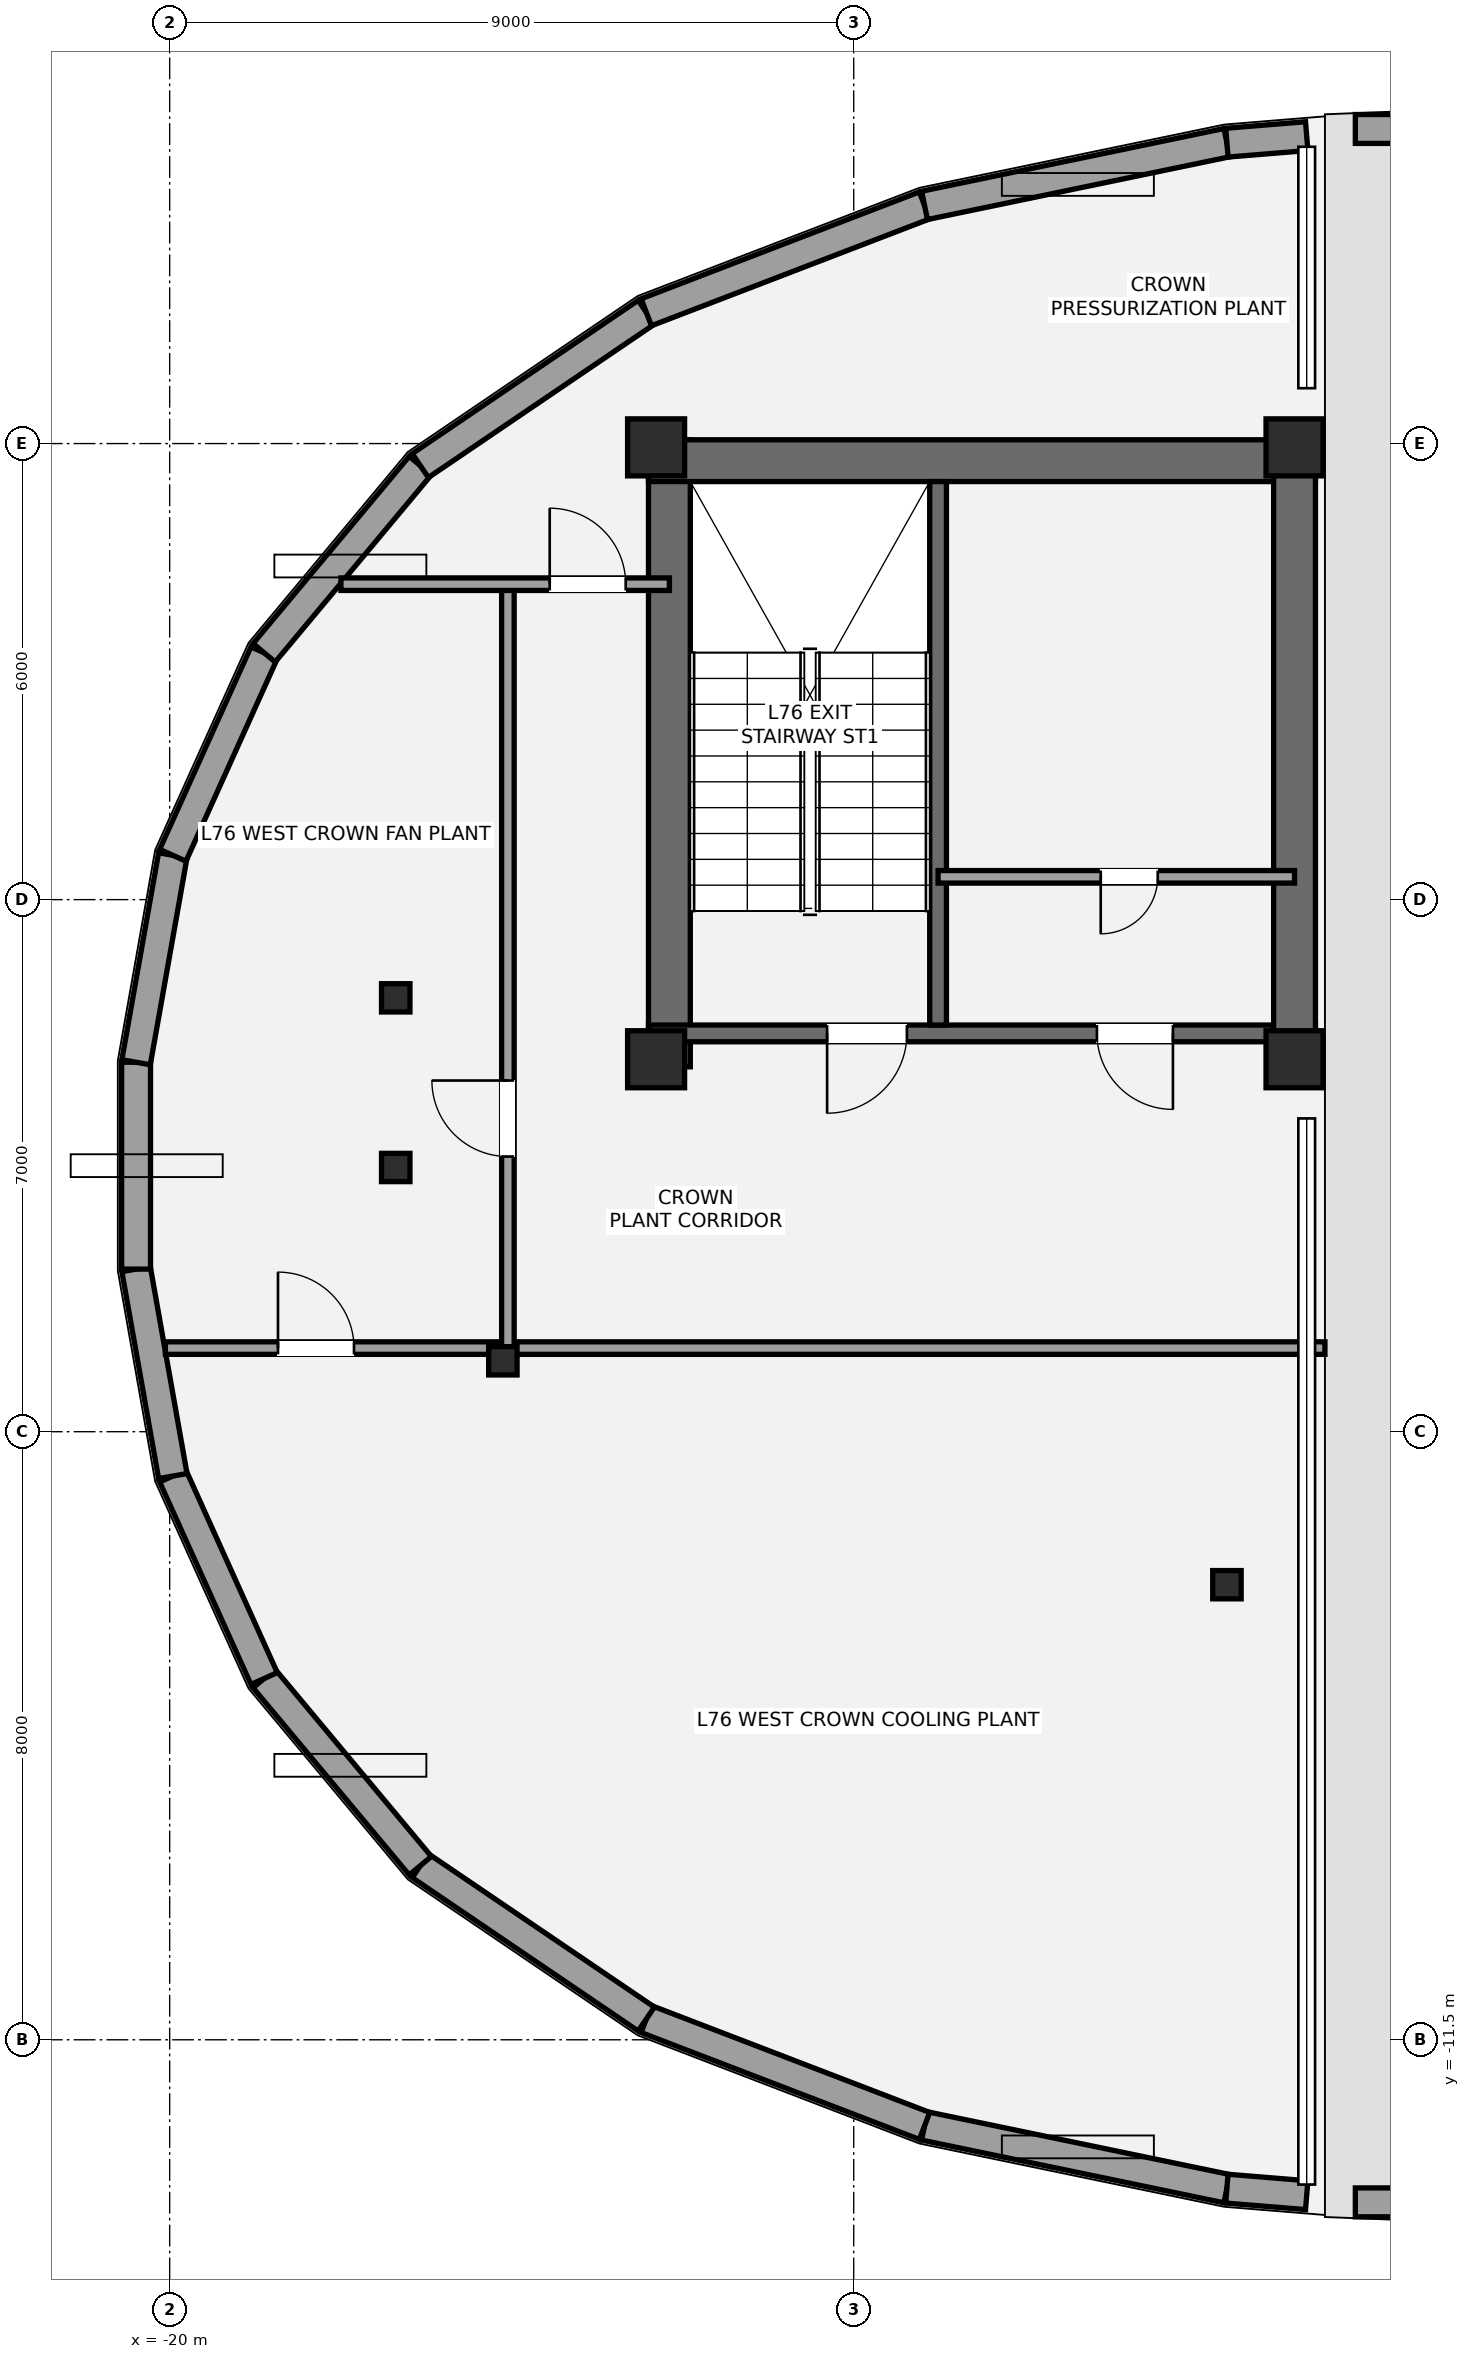
"""IFC4 building model, lengths in metres.
Left out: names, types, materials, properties, quantities, classifications, styles, units other than length and angle.
Written with IfcOpenShell. Run it as: python <this file> out.ifc"""

import sys

from ifc_helpers import new_model, si_unit, direction, frame, frame_2d, origin, origin_2d, place, context, subcontext, project, spatial, rectangle, i_section, extrude, element, fill, save


model = new_model("IFC4")
c1 = context("Model", 3, precision=1e-05, world=origin(), true_north=direction((0.0, 1.0)))
c2 = subcontext(c1, "Body", "Model", "MODEL_VIEW")
j1 = project(units=[si_unit("LENGTHUNIT", "METRE"), si_unit("PLANEANGLEUNIT", "RADIAN")], contexts=[c1])
p1 = place(None, origin())
s1 = spatial("IfcSite", under=j1, at=p1, CompositionType="ELEMENT")
p2 = place(p1, origin())
s2 = spatial("IfcBuilding", under=s1, at=p2, CompositionType="ELEMENT")
p3 = place(p2, frame((0.0, 0.0, 269.2)))
s3 = spatial("IfcBuildingStorey", under=s2, at=p3, CompositionType="ELEMENT", Elevation=269.2)
p4 = place(p3, frame((-13.425, 1.3, 0.0), z_axis=(0.0, 0.0, 1.0), x_axis=(0.0, 1.0, 0.0)))
e1 = element("IfcWall", 1, at=p4, inside=s3, PredefinedType="SHEAR", context=c2, shape_type="SweptSolid", body=[
    extrude(rectangle(XDim=8.25, YDim=0.55, at=frame_2d((4.125, 0.0))), origin(), (0.0, 0.0, 1.0), 3.8),
])
p5 = place(p3, frame((-13.7, 9.275, 0.0), z_axis=(0.0, 0.0, 1.0), x_axis=(1.0, 0.0, 0.0)))
e2 = element("IfcWall", 2, at=p5, inside=s3, PredefinedType="SHEAR", context=c2, shape_type="SweptSolid", body=[
    extrude(rectangle(XDim=8.775, YDim=0.55, at=frame_2d((4.387, 0.0))), origin(), (0.0, 0.0, 1.0), 3.8),
])
p6 = place(p3, frame((-4.925, 1.74, 0.0), z_axis=(0.0, 0.0, 1.0), x_axis=(-1.0, 0.0, 0.0)))
e3 = element("IfcWall", 3, at=p6, inside=s3, PredefinedType="SHEAR", context=c2, shape_type="SweptSolid", body=[
    extrude(rectangle(XDim=8.775, YDim=0.22, at=frame_2d((4.387, 0.0))), origin(), (0.0, 0.0, 1.0), 3.8),
])
p7 = place(p6, frame((5.375, 0.0, 0.0)))
e4 = element("IfcOpeningElement", 4, at=p7, cuts=e3, PredefinedType="OPENING", context=c2, shape_type="SweptSolid", body=[
    extrude(rectangle(XDim=1.05, YDim=2.15, at=frame_2d((0.525, 1.075))), frame((0.0, 0.12, 0.0), z_axis=(0.0, -1.0, 0.0), x_axis=(1.0, 0.0, 0.0)), (0.0, 0.0, 1.0), 0.24),
])
p8 = place(p6, frame((1.875, 0.0, 0.0)))
e5 = element("IfcOpeningElement", 5, at=p8, cuts=e3, PredefinedType="OPENING", context=c2, shape_type="SweptSolid", body=[
    extrude(rectangle(XDim=1.0, YDim=2.15, at=frame_2d((0.5, 1.075))), frame((0.0, 0.12, 0.0), z_axis=(0.0, -1.0, 0.0), x_axis=(1.0, 0.0, 0.0)), (0.0, 0.0, 1.0), 0.24),
])
p9 = place(p3, frame((-5.2, 1.3, 0.0), z_axis=(0.0, 0.0, 1.0), x_axis=(0.0, 1.0, 0.0)))
e6 = element("IfcWall", 6, at=p9, inside=s3, PredefinedType="SHEAR", context=c2, shape_type="SweptSolid", body=[
    extrude(rectangle(XDim=8.25, YDim=0.55, at=frame_2d((4.125, 0.0))), origin(), (0.0, 0.0, 1.0), 3.8),
])
p10 = place(p3, frame((-9.89, 1.85, 0.0), z_axis=(0.0, 0.0, 1.0), x_axis=(0.0, 1.0, 0.0)))
e7 = element("IfcWall", 7, at=p10, inside=s3, PredefinedType="SHEAR", context=c2, shape_type="SweptSolid", body=[
    extrude(rectangle(XDim=7.15, YDim=0.22, at=frame_2d((3.575, 0.0))), origin(), (0.0, 0.0, 1.0), 3.8),
])
for number, where, z_axis, x_axis in (
    (8, (-13.6, 1.4, 0.0), (0.0, 0.0, 1.0), (1.0, 0.0, 0.0)),
    (9, (-13.6, 9.45, 0.0), (0.0, 0.0, 1.0), (1.0, 0.0, 0.0)),
    (10, (-5.2, 1.4, 0.0), (0.0, 0.0, 1.0), (1.0, 0.0, 0.0)),
    (11, (-5.2, 9.45, 0.0), (0.0, 0.0, 1.0), (1.0, 0.0, 0.0)),
):
    element("IfcColumn", number, at=place(p3, frame(where, z_axis=z_axis, x_axis=x_axis)), inside=s3, PredefinedType="PILASTER", context=c2, shape_type="SweptSolid", body=[
        extrude(rectangle(XDim=0.75, YDim=0.75, at=origin_2d()), origin(), (0.0, 0.0, 1.0), 3.8),
    ])
for number, where, z_axis, x_axis in (
    (12, (-17.026, 2.208, 0.0), (0.0, 0.0, 1.0), (1.0, 0.0, 0.0)),
    (13, (-17.026, -0.024, 0.0), (0.0, 0.0, 1.0), (1.0, 0.0, 0.0)),
    (14, (-15.616, -2.567, 0.0), (0.0, 0.0, 1.0), (1.0, 0.0, 0.0)),
    (15, (-6.09, -5.513, 0.0), (0.0, 0.0, 1.0), (1.0, 0.0, 0.0)),
):
    element("IfcColumn", number, at=place(p3, frame(where, z_axis=z_axis, x_axis=x_axis)), inside=s3, PredefinedType="COLUMN", context=c2, shape_type="SweptSolid", body=[
        extrude(i_section(OverallWidth=0.374, OverallDepth=0.372, WebThickness=0.016, FlangeThickness=0.026, at=origin_2d()), origin(), (0.0, 0.0, 1.0), 3.8),
    ])
p11 = place(p3, frame((-10.068, -12.634, 0.0), z_axis=(0.0, 0.0, 1.0), x_axis=(0.97915503901, -0.203114277148, 0.0)))
e16 = element("IfcWall", 16, at=p11, inside=s3, PredefinedType="ELEMENTEDWALL", context=c2, shape_type="SweptSolid", body=[
    extrude(rectangle(XDim=4.063, YDim=0.38, at=frame_2d((2.031, 0.0))), origin(), (0.0, 0.0, 1.0), 2.97),
])
p12 = place(p3, frame((-13.729, -11.227, 0.0), z_axis=(0.0, 0.0, 1.0), x_axis=(0.933505951982, -0.358561902068, 0.0)))
e17 = element("IfcWall", 17, at=p12, inside=s3, PredefinedType="ELEMENTEDWALL", context=c2, shape_type="SweptSolid", body=[
    extrude(rectangle(XDim=3.922, YDim=0.38, at=frame_2d((1.961, 0.0))), origin(), (0.0, 0.0, 1.0), 2.97),
])
p13 = place(p3, frame((-16.703, -9.21, 0.0), z_axis=(0.0, 0.0, 1.0), x_axis=(0.827549057152, -0.56139340752, 0.0)))
e18 = element("IfcWall", 18, at=p13, inside=s3, PredefinedType="ELEMENTEDWALL", context=c2, shape_type="SweptSolid", body=[
    extrude(rectangle(XDim=3.593, YDim=0.38, at=frame_2d((1.796, 0.0))), origin(), (0.0, 0.0, 1.0), 2.97),
])
p14 = place(p3, frame((-18.758, -6.748, 0.0), z_axis=(0.0, 0.0, 1.0), x_axis=(0.640685893821, -0.76780309029, 0.0)))
e19 = element("IfcWall", 19, at=p14, inside=s3, PredefinedType="ELEMENTEDWALL", context=c2, shape_type="SweptSolid", body=[
    extrude(rectangle(XDim=3.207, YDim=0.38, at=frame_2d((1.604, 0.0))), origin(), (0.0, 0.0, 1.0), 2.97),
])
p15 = place(p3, frame((-19.959, -4.083, 0.0), z_axis=(0.0, 0.0, 1.0), x_axis=(0.411031522025, -0.911621131777, 0.0)))
e20 = element("IfcWall", 20, at=p15, inside=s3, PredefinedType="ELEMENTEDWALL", context=c2, shape_type="SweptSolid", body=[
    extrude(rectangle(XDim=2.922, YDim=0.38, at=frame_2d((1.461, 0.0))), origin(), (0.0, 0.0, 1.0), 2.97),
])
p16 = place(p3, frame((-20.442, -1.361, 0.0), z_axis=(0.0, 0.0, 1.0), x_axis=(0.174812712861, -0.984601703951, 0.0)))
e21 = element("IfcWall", 21, at=p16, inside=s3, PredefinedType="ELEMENTEDWALL", context=c2, shape_type="SweptSolid", body=[
    extrude(rectangle(XDim=2.765, YDim=0.38, at=frame_2d((1.383, 0.0))), origin(), (0.0, 0.0, 1.0), 2.97),
])
p17 = place(p3, frame((-20.442, 1.361, 0.0), z_axis=(0.0, 0.0, 1.0), x_axis=(0.0, -1.0, 0.0)))
e22 = element("IfcWall", 22, at=p17, inside=s3, PredefinedType="ELEMENTEDWALL", context=c2, shape_type="SweptSolid", body=[
    extrude(rectangle(XDim=2.722, YDim=0.38, at=frame_2d((1.361, 0.0))), origin(), (0.0, 0.0, 1.0), 2.97),
])
p18 = place(p3, frame((-19.959, 4.083, 0.0), z_axis=(0.0, 0.0, 1.0), x_axis=(-0.174812712861, -0.984601703951, 0.0)))
e23 = element("IfcWall", 23, at=p18, inside=s3, PredefinedType="ELEMENTEDWALL", context=c2, shape_type="SweptSolid", body=[
    extrude(rectangle(XDim=2.765, YDim=0.38, at=frame_2d((1.383, 0.0))), origin(), (0.0, 0.0, 1.0), 2.97),
])
p19 = place(p3, frame((-18.758, 6.748, 0.0), z_axis=(0.0, 0.0, 1.0), x_axis=(-0.411031522025, -0.911621131777, 0.0)))
e24 = element("IfcWall", 24, at=p19, inside=s3, PredefinedType="ELEMENTEDWALL", context=c2, shape_type="SweptSolid", body=[
    extrude(rectangle(XDim=2.922, YDim=0.38, at=frame_2d((1.461, 0.0))), origin(), (0.0, 0.0, 1.0), 2.97),
])
p20 = place(p3, frame((-16.703, 9.21, 0.0), z_axis=(0.0, 0.0, 1.0), x_axis=(-0.640685893821, -0.76780309029, 0.0)))
e25 = element("IfcWall", 25, at=p20, inside=s3, PredefinedType="ELEMENTEDWALL", context=c2, shape_type="SweptSolid", body=[
    extrude(rectangle(XDim=3.207, YDim=0.38, at=frame_2d((1.604, 0.0))), origin(), (0.0, 0.0, 1.0), 2.97),
])
p21 = place(p3, frame((-13.729, 11.227, 0.0), z_axis=(0.0, 0.0, 1.0), x_axis=(-0.827549057152, -0.56139340752, 0.0)))
e26 = element("IfcWall", 26, at=p21, inside=s3, PredefinedType="ELEMENTEDWALL", context=c2, shape_type="SweptSolid", body=[
    extrude(rectangle(XDim=3.593, YDim=0.38, at=frame_2d((1.796, 0.0))), origin(), (0.0, 0.0, 1.0), 2.97),
])
p22 = place(p3, frame((-10.068, 12.634, 0.0), z_axis=(0.0, 0.0, 1.0), x_axis=(-0.933505951982, -0.358561902068, 0.0)))
e27 = element("IfcWall", 27, at=p22, inside=s3, PredefinedType="ELEMENTEDWALL", context=c2, shape_type="SweptSolid", body=[
    extrude(rectangle(XDim=3.922, YDim=0.38, at=frame_2d((1.961, 0.0))), origin(), (0.0, 0.0, 1.0), 2.97),
])
p23 = place(p3, frame((-6.09, 13.459, 0.0), z_axis=(0.0, 0.0, 1.0), x_axis=(-0.97915503901, -0.203114277148, 0.0)))
e28 = element("IfcWall", 28, at=p23, inside=s3, PredefinedType="ELEMENTEDWALL", context=c2, shape_type="SweptSolid", body=[
    extrude(rectangle(XDim=4.063, YDim=0.38, at=frame_2d((2.031, 0.0))), origin(), (0.0, 0.0, 1.0), 2.97),
])
for number, where, z_axis, x_axis in (
    (29, (-5.04, 13.545, 0.0), (0.0, 0.0, 1.0), (-0.997, -0.082, 0.0)),
    (30, (-6.09, -13.459, 0.0), (0.0, 0.0, 1.0), (0.997, -0.082, 0.0)),
):
    element("IfcWall", number, at=place(p3, frame(where, z_axis=z_axis, x_axis=x_axis)), inside=s3, PredefinedType="ELEMENTEDWALL", context=c2, shape_type="SweptSolid", body=[
        extrude(rectangle(XDim=1.053, YDim=0.38, at=frame_2d((0.527, 0.0))), origin(), (0.0, 0.0, 1.0), 2.97),
    ])
for number, where, z_axis, x_axis in (
    (31, (-4.4, -13.639, 0.0), (0.0, 0.0, 1.0), (1.0, 0.0, 0.0)),
    (32, (4.4, 13.639, 0.0), (0.0, 0.0, 1.0), (-1.0, 0.0, 0.0)),
):
    element("IfcWall", number, at=place(p3, frame(where, z_axis=z_axis, x_axis=x_axis)), inside=s3, PredefinedType="PARAPET", context=c2, shape_type="SweptSolid", body=[
        extrude(rectangle(XDim=8.8, YDim=0.38, at=frame_2d((4.4, 0.0))), origin(), (0.0, 0.0, 1.0), 1.15),
    ])
p24 = place(p3, frame((-5.2, 3.8, 0.0), z_axis=(0.0, 0.0, 1.0), x_axis=(-1.0, 0.0, 0.0)))
e33 = element("IfcWall", 33, at=p24, inside=s3, PredefinedType="PARTITIONING", context=c2, shape_type="SweptSolid", body=[
    extrude(rectangle(XDim=4.69, YDim=0.165, at=frame_2d((2.345, 0.0))), origin(), (0.0, 0.0, 1.0), 3.6),
])
p25 = place(p24, frame((1.8, 0.0, 0.0)))
e34 = element("IfcOpeningElement", 34, at=p25, cuts=e33, PredefinedType="OPENING", context=c2, shape_type="SweptSolid", body=[
    extrude(rectangle(XDim=0.75, YDim=2.1, at=frame_2d((0.375, 1.05))), frame((0.0, 0.093, 0.0), z_axis=(0.0, -1.0, 0.0), x_axis=(1.0, 0.0, 0.0)), (0.0, 0.0, 1.0), 0.185),
])
p26 = place(p3, frame((-20.056, -2.4, 0.0), z_axis=(0.0, 0.0, 1.0), x_axis=(1.0, 0.0, 0.0)))
e35 = element("IfcWall", 35, at=p26, inside=s3, PredefinedType="PARTITIONING", context=c2, shape_type="SweptSolid", body=[
    extrude(rectangle(XDim=15.256, YDim=0.165, at=frame_2d((7.628, 0.0))), origin(), (0.0, 0.0, 1.0), 2.987),
])
p27 = place(p26, frame((1.482, 0.0, 0.0)))
e36 = element("IfcOpeningElement", 36, at=p27, cuts=e35, PredefinedType="OPENING", context=c2, shape_type="SweptSolid", body=[
    extrude(rectangle(XDim=1.0, YDim=2.15, at=frame_2d((0.5, 1.075))), frame((0.0, 0.093, 0.0), z_axis=(0.0, -1.0, 0.0), x_axis=(1.0, 0.0, 0.0)), (0.0, 0.0, 1.0), 0.185),
])
p28 = place(p3, frame((-15.55, -2.4, 0.0), z_axis=(0.0, 0.0, 1.0), x_axis=(0.0, 1.0, 0.0)))
e37 = element("IfcWall", 37, at=p28, inside=s3, PredefinedType="PARTITIONING", context=c2, shape_type="SweptSolid", body=[
    extrude(rectangle(XDim=10.05, YDim=0.165, at=frame_2d((5.025, 0.0))), origin(), (0.0, 0.0, 1.0), 2.987),
])
p29 = place(p28, frame((2.52, 0.0, 0.0)))
e38 = element("IfcOpeningElement", 38, at=p29, cuts=e37, PredefinedType="OPENING", context=c2, shape_type="SweptSolid", body=[
    extrude(rectangle(XDim=1.0, YDim=2.15, at=frame_2d((0.5, 1.075))), frame((0.0, 0.093, 0.0), z_axis=(0.0, -1.0, 0.0), x_axis=(1.0, 0.0, 0.0)), (0.0, 0.0, 1.0), 0.185),
])
p30 = place(p3, frame((-17.747, 7.65, 0.0), z_axis=(0.0, 0.0, 1.0), x_axis=(1.0, 0.0, 0.0)))
e39 = element("IfcWall", 39, at=p30, inside=s3, PredefinedType="PARTITIONING", context=c2, shape_type="SweptSolid", body=[
    extrude(rectangle(XDim=4.322, YDim=0.165, at=frame_2d((2.161, 0.0))), origin(), (0.0, 0.0, 1.0), 2.968),
])
p31 = place(p30, frame((2.747, 0.0, 0.0)))
e40 = element("IfcOpeningElement", 40, at=p31, cuts=e39, PredefinedType="OPENING", context=c2, shape_type="SweptSolid", body=[
    extrude(rectangle(XDim=1.0, YDim=2.15, at=frame_2d((0.5, 1.075))), frame((0.0, 0.093, 0.0), z_axis=(0.0, -1.0, 0.0), x_axis=(1.0, 0.0, 0.0)), (0.0, 0.0, 1.0), 0.185),
])
p32 = place(p7, origin())
e41 = element("IfcDoor", 41, at=p32, inside=s3, OperationType="SINGLE_SWING_RIGHT", PredefinedType="DOOR", context=c2, shape_type="SweptSolid", body=[
    extrude(rectangle(XDim=1.05, YDim=2.15, at=frame_2d((0.525, 1.075))), frame((0.0, 0.025, 0.0), z_axis=(0.0, -1.0, 0.0), x_axis=(1.0, 0.0, 0.0)), (0.0, 0.0, 1.0), 0.05),
])
fill(e4, e41)
p33 = place(p8, origin())
e42 = element("IfcDoor", 42, at=p33, inside=s3, OperationType="SINGLE_SWING_LEFT", PredefinedType="DOOR", context=c2, shape_type="SweptSolid", body=[
    extrude(rectangle(XDim=1.0, YDim=2.15, at=frame_2d((0.5, 1.075))), frame((0.0, 0.025, 0.0), z_axis=(0.0, -1.0, 0.0), x_axis=(1.0, 0.0, 0.0)), (0.0, 0.0, 1.0), 0.05),
])
fill(e5, e42)
p34 = place(p25, origin())
e43 = element("IfcDoor", 43, at=p34, inside=s3, OperationType="SINGLE_SWING_RIGHT", PredefinedType="DOOR", context=c2, shape_type="SweptSolid", body=[
    extrude(rectangle(XDim=0.75, YDim=2.1, at=frame_2d((0.375, 1.05))), frame((0.0, 0.025, 0.0), z_axis=(0.0, -1.0, 0.0), x_axis=(1.0, 0.0, 0.0)), (0.0, 0.0, 1.0), 0.05),
])
fill(e34, e43)
p35 = place(p27, origin())
e44 = element("IfcDoor", 44, at=p35, inside=s3, OperationType="SINGLE_SWING_LEFT", PredefinedType="DOOR", context=c2, shape_type="SweptSolid", body=[
    extrude(rectangle(XDim=1.0, YDim=2.15, at=frame_2d((0.5, 1.075))), frame((0.0, 0.025, 0.0), z_axis=(0.0, -1.0, 0.0), x_axis=(1.0, 0.0, 0.0)), (0.0, 0.0, 1.0), 0.05),
])
fill(e36, e44)
p36 = place(p29, origin())
e45 = element("IfcDoor", 45, at=p36, inside=s3, OperationType="SINGLE_SWING_RIGHT", PredefinedType="DOOR", context=c2, shape_type="SweptSolid", body=[
    extrude(rectangle(XDim=1.0, YDim=2.15, at=frame_2d((0.5, 1.075))), frame((0.0, 0.025, 0.0), z_axis=(0.0, -1.0, 0.0), x_axis=(1.0, 0.0, 0.0)), (0.0, 0.0, 1.0), 0.05),
])
fill(e38, e45)
p37 = place(p31, origin())
e46 = element("IfcDoor", 46, at=p37, inside=s3, OperationType="SINGLE_SWING_LEFT", PredefinedType="DOOR", context=c2, shape_type="SweptSolid", body=[
    extrude(rectangle(XDim=1.0, YDim=2.15, at=frame_2d((0.5, 1.075))), frame((0.0, 0.025, 0.0), z_axis=(0.0, -1.0, 0.0), x_axis=(1.0, 0.0, 0.0)), (0.0, 0.0, 1.0), 0.05),
])
fill(e40, e46)
save(model, sys.argv[1])
